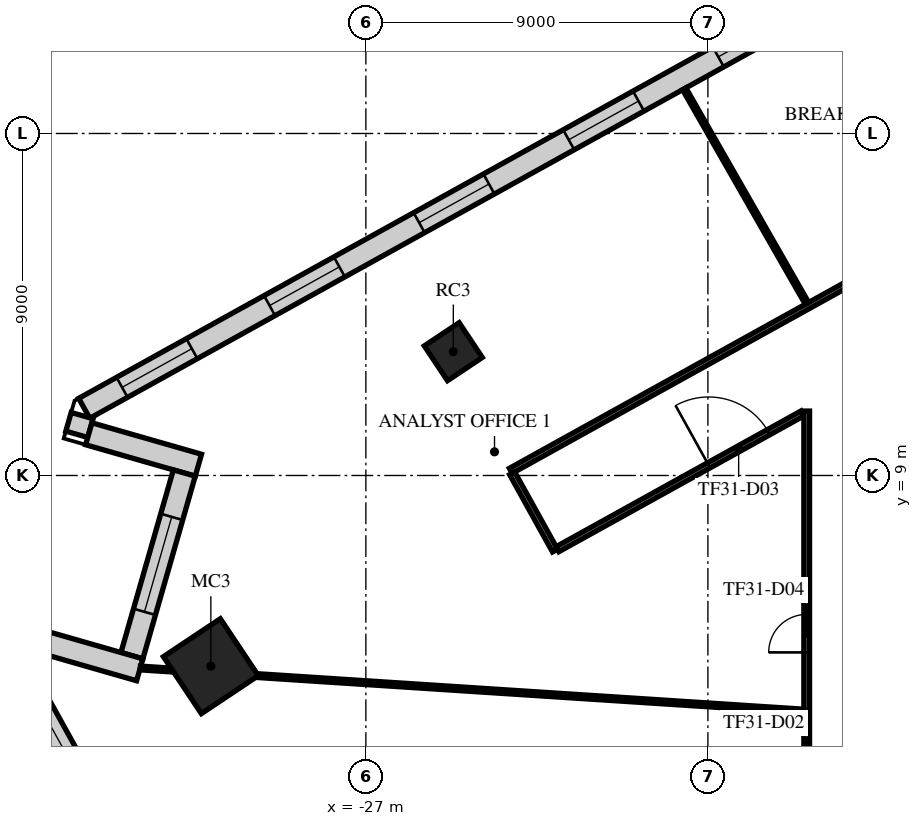
"""IFC4 building model, lengths in metres.
Left out: names, types, materials, properties, quantities, classifications, styles, units other than length and angle.
Written with IfcOpenShell. Run it as: python <this file> out.ifc"""

import sys

from ifc_helpers import new_model, si_unit, direction, frame, frame_2d, origin, origin_2d, place, context, subcontext, project, spatial, rectangle, extrude, element, fill, save


model = new_model("IFC4")
c1 = context("Model", 3, precision=1e-05, world=origin(), true_north=direction((0.0, 1.0)))
c2 = subcontext(c1, "Body", "Model", "MODEL_VIEW")
j1 = project(units=[si_unit("LENGTHUNIT", "METRE"), si_unit("PLANEANGLEUNIT", "RADIAN")], contexts=[c1])
p1 = place(None, origin())
s1 = spatial("IfcSite", under=j1, at=p1, CompositionType="ELEMENT")
p2 = place(p1, origin())
s2 = spatial("IfcBuilding", under=s1, at=p2, CompositionType="ELEMENT")
p3 = place(p2, frame((0.0, 0.0, 135.7)))
s3 = spatial("IfcBuildingStorey", under=s2, at=p3, CompositionType="ELEMENT", Elevation=135.7)
p4 = place(p3, frame((-24.699, 12.258, -0.4), z_axis=(0.0, 0.0, 1.0), x_axis=(0.832028680356, 0.55473261583, 0.0)))
e1 = element("IfcColumn", 1, at=p4, inside=s3, PredefinedType="COLUMN", context=c2, shape_type="SweptSolid", body=[
    extrude(rectangle(XDim=1.1, YDim=1.1, at=origin_2d()), origin(), (0.0, 0.0, 1.0), 4.4),
])
p5 = place(p3, frame((-31.079, 3.982, -0.4), z_axis=(0.0, 0.0, 1.0), x_axis=(0.832028680356, 0.55473261583, 0.0)))
e2 = element("IfcColumn", 2, at=p5, inside=s3, PredefinedType="COLUMN", context=c2, shape_type="SweptSolid", body=[
    extrude(rectangle(XDim=1.8, YDim=1.8, at=origin_2d()), origin(), (0.0, 0.0, 1.0), 4.4),
])
p6 = place(p3, frame((8.775, 34.705, 0.0), z_axis=(0.0, 0.0, 1.0), x_axis=(-0.874620778241, -0.484807687922, 0.0)))
e3 = element("IfcWall", 3, at=p6, inside=s3, PredefinedType="STANDARD", context=c2, shape_type="SweptSolid", body=[
    extrude(rectangle(XDim=49.376, YDim=0.6, at=frame_2d((24.688, 0.0))), origin(), (0.0, 0.0, 1.0), 3.6),
])
p7 = place(p6, frame((1.2, 0.0, 0.9)))
e4 = element("IfcOpeningElement", 4, at=p7, cuts=e3, PredefinedType="OPENING", context=c2, shape_type="SweptSolid", body=[
    extrude(rectangle(XDim=2.1, YDim=2.1, at=frame_2d((1.05, 1.05))), frame((0.0, 0.31, 0.0), z_axis=(0.0, -1.0, 0.0), x_axis=(1.0, 0.0, 0.0)), (0.0, 0.0, 1.0), 0.62),
])
p8 = place(p6, frame((5.7, 0.0, 0.9)))
e5 = element("IfcOpeningElement", 5, at=p8, cuts=e3, PredefinedType="OPENING", context=c2, shape_type="SweptSolid", body=[
    extrude(rectangle(XDim=2.1, YDim=2.1, at=frame_2d((1.05, 1.05))), frame((0.0, 0.31, 0.0), z_axis=(0.0, -1.0, 0.0), x_axis=(1.0, 0.0, 0.0)), (0.0, 0.0, 1.0), 0.62),
])
p9 = place(p6, frame((14.7, 0.0, 0.9)))
e6 = element("IfcOpeningElement", 6, at=p9, cuts=e3, PredefinedType="OPENING", context=c2, shape_type="SweptSolid", body=[
    extrude(rectangle(XDim=2.1, YDim=2.1, at=frame_2d((1.05, 1.05))), frame((0.0, 0.31, 0.0), z_axis=(0.0, -1.0, 0.0), x_axis=(1.0, 0.0, 0.0)), (0.0, 0.0, 1.0), 0.62),
])
p10 = place(p6, frame((19.2, 0.0, 0.9)))
e7 = element("IfcOpeningElement", 7, at=p10, cuts=e3, PredefinedType="OPENING", context=c2, shape_type="SweptSolid", body=[
    extrude(rectangle(XDim=2.1, YDim=2.1, at=frame_2d((1.05, 1.05))), frame((0.0, 0.31, 0.0), z_axis=(0.0, -1.0, 0.0), x_axis=(1.0, 0.0, 0.0)), (0.0, 0.0, 1.0), 0.62),
])
p11 = place(p6, frame((23.7, 0.0, 0.9)))
e8 = element("IfcOpeningElement", 8, at=p11, cuts=e3, PredefinedType="OPENING", context=c2, shape_type="SweptSolid", body=[
    extrude(rectangle(XDim=2.1, YDim=2.1, at=frame_2d((1.05, 1.05))), frame((0.0, 0.31, 0.0), z_axis=(0.0, -1.0, 0.0), x_axis=(1.0, 0.0, 0.0)), (0.0, 0.0, 1.0), 0.62),
])
p12 = place(p6, frame((28.2, 0.0, 0.9)))
e9 = element("IfcOpeningElement", 9, at=p12, cuts=e3, PredefinedType="OPENING", context=c2, shape_type="SweptSolid", body=[
    extrude(rectangle(XDim=2.1, YDim=2.1, at=frame_2d((1.05, 1.05))), frame((0.0, 0.31, 0.0), z_axis=(0.0, -1.0, 0.0), x_axis=(1.0, 0.0, 0.0)), (0.0, 0.0, 1.0), 0.62),
])
p13 = place(p6, frame((32.7, 0.0, 0.9)))
e10 = element("IfcOpeningElement", 10, at=p13, cuts=e3, PredefinedType="OPENING", context=c2, shape_type="SweptSolid", body=[
    extrude(rectangle(XDim=2.1, YDim=2.1, at=frame_2d((1.05, 1.05))), frame((0.0, 0.31, 0.0), z_axis=(0.0, -1.0, 0.0), x_axis=(1.0, 0.0, 0.0)), (0.0, 0.0, 1.0), 0.62),
])
p14 = place(p6, frame((37.2, 0.0, 0.9)))
e11 = element("IfcOpeningElement", 11, at=p14, cuts=e3, PredefinedType="OPENING", context=c2, shape_type="SweptSolid", body=[
    extrude(rectangle(XDim=2.1, YDim=2.1, at=frame_2d((1.05, 1.05))), frame((0.0, 0.31, 0.0), z_axis=(0.0, -1.0, 0.0), x_axis=(1.0, 0.0, 0.0)), (0.0, 0.0, 1.0), 0.62),
])
p15 = place(p6, frame((41.7, 0.0, 0.9)))
e12 = element("IfcOpeningElement", 12, at=p15, cuts=e3, PredefinedType="OPENING", context=c2, shape_type="SweptSolid", body=[
    extrude(rectangle(XDim=2.1, YDim=2.1, at=frame_2d((1.05, 1.05))), frame((0.0, 0.31, 0.0), z_axis=(0.0, -1.0, 0.0), x_axis=(1.0, 0.0, 0.0)), (0.0, 0.0, 1.0), 0.62),
])
p16 = place(p6, frame((46.138, 0.0, 0.9)))
e13 = element("IfcOpeningElement", 13, at=p16, cuts=e3, PredefinedType="OPENING", context=c2, shape_type="SweptSolid", body=[
    extrude(rectangle(XDim=2.1, YDim=2.1, at=frame_2d((1.05, 1.05))), frame((0.0, 0.31, 0.0), z_axis=(0.0, -1.0, 0.0), x_axis=(1.0, 0.0, 0.0)), (0.0, 0.0, 1.0), 0.62),
])
p17 = place(p3, frame((-34.466, 10.575, 0.0), z_axis=(0.0, 0.0, 1.0), x_axis=(-0.275667500387, -0.96125305161, 0.0)))
e14 = element("IfcWall", 14, at=p17, inside=s3, PredefinedType="STANDARD", context=c2, shape_type="SweptSolid", body=[
    extrude(rectangle(XDim=0.511, YDim=0.6, at=frame_2d((0.255, 0.0))), origin(), (0.0, 0.0, 1.0), 3.6),
])
p18 = place(p3, frame((-34.291, 10.097, 0.0), z_axis=(0.0, 0.0, 1.0), x_axis=(0.96126248289, -0.275634611374, 0.0)))
e15 = element("IfcWall", 15, at=p18, inside=s3, PredefinedType="STANDARD", context=c2, shape_type="SweptSolid", body=[
    extrude(rectangle(XDim=3.0, YDim=0.6, at=frame_2d((1.5, 0.0))), origin(), (0.0, 0.0, 1.0), 3.6),
])
p19 = place(p3, frame((-31.778, 9.065, 0.0), z_axis=(0.0, 0.0, 1.0), x_axis=(-0.275675415896, -0.961250781571, 0.0)))
e16 = element("IfcWall", 16, at=p19, inside=s3, PredefinedType="STANDARD", context=c2, shape_type="SweptSolid", body=[
    extrude(rectangle(XDim=5.0, YDim=0.6, at=frame_2d((2.5, 0.0))), origin(), (0.0, 0.0, 1.0), 3.6),
])
p20 = place(p19, frame((1.2, 0.0, 0.9)))
e17 = element("IfcOpeningElement", 17, at=p20, cuts=e16, PredefinedType="OPENING", context=c2, shape_type="SweptSolid", body=[
    extrude(rectangle(XDim=2.6, YDim=2.1, at=frame_2d((1.3, 1.05))), frame((0.0, 0.31, 0.0), z_axis=(0.0, -1.0, 0.0), x_axis=(1.0, 0.0, 0.0)), (0.0, 0.0, 1.0), 0.62),
])
p21 = place(p3, frame((-32.95, 3.887, 0.0), z_axis=(0.0, 0.0, 1.0), x_axis=(-0.96126248289, 0.275634611374, 0.0)))
e18 = element("IfcWall", 18, at=p21, inside=s3, PredefinedType="STANDARD", context=c2, shape_type="SweptSolid", body=[
    extrude(rectangle(XDim=3.0, YDim=0.6, at=frame_2d((1.5, 0.0))), origin(), (0.0, 0.0, 1.0), 3.6),
])
p22 = place(p3, frame((-36.291, 4.209, 0.0), z_axis=(0.0, 0.0, 1.0), x_axis=(0.484810659622, -0.874619131003, 0.0)))
e19 = element("IfcWall", 19, at=p22, inside=s3, PredefinedType="STANDARD", context=c2, shape_type="SweptSolid", body=[
    extrude(rectangle(XDim=42.552, YDim=0.6, at=frame_2d((21.276, 0.0))), origin(), (0.0, 0.0, 1.0), 3.6),
])
p23 = place(p22, frame((1.178, 0.0, 0.9)))
e20 = element("IfcOpeningElement", 20, at=p23, cuts=e19, PredefinedType="OPENING", context=c2, shape_type="SweptSolid", body=[
    extrude(rectangle(XDim=1.8, YDim=2.1, at=frame_2d((0.9, 1.05))), frame((0.0, 0.31, 0.0), z_axis=(0.0, -1.0, 0.0), x_axis=(1.0, 0.0, 0.0)), (0.0, 0.0, 1.0), 0.62),
])
p24 = place(p22, frame((5.396, 0.0, 0.9)))
e21 = element("IfcOpeningElement", 21, at=p24, cuts=e19, PredefinedType="OPENING", context=c2, shape_type="SweptSolid", body=[
    extrude(rectangle(XDim=1.8, YDim=2.1, at=frame_2d((0.9, 1.05))), frame((0.0, 0.31, 0.0), z_axis=(0.0, -1.0, 0.0), x_axis=(1.0, 0.0, 0.0)), (0.0, 0.0, 1.0), 0.62),
])
p25 = place(p22, frame((13.956, 0.0, 0.9)))
e22 = element("IfcOpeningElement", 22, at=p25, cuts=e19, PredefinedType="OPENING", context=c2, shape_type="SweptSolid", body=[
    extrude(rectangle(XDim=1.8, YDim=2.1, at=frame_2d((0.9, 1.05))), frame((0.0, 0.31, 0.0), z_axis=(0.0, -1.0, 0.0), x_axis=(1.0, 0.0, 0.0)), (0.0, 0.0, 1.0), 0.62),
])
p26 = place(p22, frame((18.236, 0.0, 0.9)))
e23 = element("IfcOpeningElement", 23, at=p26, cuts=e19, PredefinedType="OPENING", context=c2, shape_type="SweptSolid", body=[
    extrude(rectangle(XDim=1.8, YDim=2.1, at=frame_2d((0.9, 1.05))), frame((0.0, 0.31, 0.0), z_axis=(0.0, -1.0, 0.0), x_axis=(1.0, 0.0, 0.0)), (0.0, 0.0, 1.0), 0.62),
])
p27 = place(p22, frame((22.516, 0.0, 0.9)))
e24 = element("IfcOpeningElement", 24, at=p27, cuts=e19, PredefinedType="OPENING", context=c2, shape_type="SweptSolid", body=[
    extrude(rectangle(XDim=1.8, YDim=2.1, at=frame_2d((0.9, 1.05))), frame((0.0, 0.31, 0.0), z_axis=(0.0, -1.0, 0.0), x_axis=(1.0, 0.0, 0.0)), (0.0, 0.0, 1.0), 0.62),
])
p28 = place(p22, frame((26.796, 0.0, 0.9)))
e25 = element("IfcOpeningElement", 25, at=p28, cuts=e19, PredefinedType="OPENING", context=c2, shape_type="SweptSolid", body=[
    extrude(rectangle(XDim=1.8, YDim=2.1, at=frame_2d((0.9, 1.05))), frame((0.0, 0.31, 0.0), z_axis=(0.0, -1.0, 0.0), x_axis=(1.0, 0.0, 0.0)), (0.0, 0.0, 1.0), 0.62),
])
p29 = place(p22, frame((31.076, 0.0, 0.9)))
e26 = element("IfcOpeningElement", 26, at=p29, cuts=e19, PredefinedType="OPENING", context=c2, shape_type="SweptSolid", body=[
    extrude(rectangle(XDim=1.8, YDim=2.1, at=frame_2d((0.9, 1.05))), frame((0.0, 0.31, 0.0), z_axis=(0.0, -1.0, 0.0), x_axis=(1.0, 0.0, 0.0)), (0.0, 0.0, 1.0), 0.62),
])
p30 = place(p22, frame((35.356, 0.0, 0.9)))
e27 = element("IfcOpeningElement", 27, at=p30, cuts=e19, PredefinedType="OPENING", context=c2, shape_type="SweptSolid", body=[
    extrude(rectangle(XDim=1.8, YDim=2.1, at=frame_2d((0.9, 1.05))), frame((0.0, 0.31, 0.0), z_axis=(0.0, -1.0, 0.0), x_axis=(1.0, 0.0, 0.0)), (0.0, 0.0, 1.0), 0.62),
])
p31 = place(p22, frame((39.573, 0.0, 0.9)))
e28 = element("IfcOpeningElement", 28, at=p31, cuts=e19, PredefinedType="OPENING", context=c2, shape_type="SweptSolid", body=[
    extrude(rectangle(XDim=1.8, YDim=2.1, at=frame_2d((0.9, 1.05))), frame((0.0, 0.31, 0.0), z_axis=(0.0, -1.0, 0.0), x_axis=(1.0, 0.0, 0.0)), (0.0, 0.0, 1.0), 0.62),
])
p32 = place(p3, frame((-23.187, 9.123, 0.0), z_axis=(0.0, 0.0, 1.0), x_axis=(0.874618419846, 0.484811942578, 0.0)))
e29 = element("IfcWall", 29, at=p32, inside=s3, PredefinedType="PARTITIONING", context=c2, shape_type="SweptSolid", body=[
    extrude(rectangle(XDim=31.713, YDim=0.15, at=frame_2d((15.857, 0.0))), origin(), (0.0, 0.0, 1.0), 3.15),
])
p33 = place(p32, frame((11.252, 0.0, 0.0)))
e30 = element("IfcOpeningElement", 30, at=p33, cuts=e29, PredefinedType="OPENING", context=c2, shape_type="SweptSolid", body=[
    extrude(rectangle(XDim=1.0, YDim=2.1, at=frame_2d((0.5, 1.05))), frame((0.0, 0.085, 0.0), z_axis=(0.0, -1.0, 0.0), x_axis=(1.0, 0.0, 0.0)), (0.0, 0.0, 1.0), 0.17),
])
p34 = place(p32, frame((19.896, 0.0, 0.0)))
e31 = element("IfcOpeningElement", 31, at=p34, cuts=e29, PredefinedType="OPENING", context=c2, shape_type="SweptSolid", body=[
    extrude(rectangle(XDim=1.0, YDim=2.1, at=frame_2d((0.5, 1.05))), frame((0.0, 0.085, 0.0), z_axis=(0.0, -1.0, 0.0), x_axis=(1.0, 0.0, 0.0)), (0.0, 0.0, 1.0), 0.17),
])
p35 = place(p32, frame((29.223, 0.0, 0.0)))
e32 = element("IfcOpeningElement", 32, at=p35, cuts=e29, PredefinedType="OPENING", context=c2, shape_type="SweptSolid", body=[
    extrude(rectangle(XDim=1.0, YDim=2.1, at=frame_2d((0.5, 1.05))), frame((0.0, 0.085, 0.0), z_axis=(0.0, -1.0, 0.0), x_axis=(1.0, 0.0, 0.0)), (0.0, 0.0, 1.0), 0.17),
])
p36 = place(p3, frame((-23.151, 9.057, 0.0), z_axis=(0.0, 0.0, 1.0), x_axis=(0.484983092102, -0.874523527628, 0.0)))
e33 = element("IfcWall", 33, at=p36, inside=s3, PredefinedType="PARTITIONING", context=c2, shape_type="SweptSolid", body=[
    extrude(rectangle(XDim=2.325, YDim=0.15, at=frame_2d((1.163, 0.0))), origin(), (0.0, 0.0, 1.0), 3.15),
])
p37 = place(p3, frame((-21.958, 7.06, 0.0), z_axis=(0.0, 0.0, 1.0), x_axis=(0.87462563297, 0.484798929611, 0.0)))
e34 = element("IfcWall", 34, at=p37, inside=s3, PredefinedType="PARTITIONING", context=c2, shape_type="SweptSolid", body=[
    extrude(rectangle(XDim=7.37, YDim=0.15, at=frame_2d((3.685, 0.0))), origin(), (0.0, 0.0, 1.0), 3.15),
])
p38 = place(p37, frame((4.55, 0.0, 0.0)))
e35 = element("IfcOpeningElement", 35, at=p38, cuts=e34, PredefinedType="OPENING", context=c2, shape_type="SweptSolid", body=[
    extrude(rectangle(XDim=1.8, YDim=2.1, at=frame_2d((0.9, 1.05))), frame((0.0, 0.085, 0.0), z_axis=(0.0, -1.0, 0.0), x_axis=(1.0, 0.0, 0.0)), (0.0, 0.0, 1.0), 0.17),
])
p39 = place(p3, frame((-15.4, -3.201, 0.0), z_axis=(0.0, 0.0, 1.0), x_axis=(0.0, 1.0, 0.0)))
e36 = element("IfcWall", 36, at=p39, inside=s3, PredefinedType="PARTITIONING", context=c2, shape_type="SweptSolid", body=[
    extrude(rectangle(XDim=13.896, YDim=0.15, at=frame_2d((6.948, 0.0))), origin(), (0.0, 0.0, 1.0), 3.15),
])
p40 = place(p39, frame((4.05, 0.0, 0.0)))
e37 = element("IfcOpeningElement", 37, at=p40, cuts=e36, PredefinedType="OPENING", context=c2, shape_type="SweptSolid", body=[
    extrude(rectangle(XDim=1.0, YDim=2.1, at=frame_2d((0.5, 1.05))), frame((0.0, 0.085, 0.0), z_axis=(0.0, -1.0, 0.0), x_axis=(1.0, 0.0, 0.0)), (0.0, 0.0, 1.0), 0.17),
])
p41 = place(p39, frame((7.546, 0.0, 0.0)))
e38 = element("IfcOpeningElement", 38, at=p41, cuts=e36, PredefinedType="OPENING", context=c2, shape_type="SweptSolid", body=[
    extrude(rectangle(XDim=1.0, YDim=2.1, at=frame_2d((0.5, 1.05))), frame((0.0, 0.085, 0.0), z_axis=(0.0, -1.0, 0.0), x_axis=(1.0, 0.0, 0.0)), (0.0, 0.0, 1.0), 0.17),
])
p42 = place(p3, frame((-32.935, 3.934, 0.0), z_axis=(0.0, 0.0, 1.0), x_axis=(0.997900062075, -0.064772417822, 0.0)))
e39 = element("IfcWall", 39, at=p42, inside=s3, PredefinedType="PARTITIONING", context=c2, shape_type="SweptSolid", body=[
    extrude(rectangle(XDim=0.844, YDim=0.1, at=frame_2d((0.422, 0.0))), origin(), (0.0, 0.0, 1.0), 3.6),
])
p43 = place(p3, frame((-29.831, 3.732, 0.0), z_axis=(0.0, 0.0, 1.0), x_axis=(0.997896608912, -0.0648255962, 0.0)))
e40 = element("IfcWall", 40, at=p43, inside=s3, PredefinedType="PARTITIONING", context=c2, shape_type="SweptSolid", body=[
    extrude(rectangle(XDim=14.383, YDim=0.1, at=frame_2d((7.191, 0.0))), origin(), (0.0, 0.0, 1.0), 3.03),
])
p44 = place(p3, frame((-18.622, 19.174, 0.0), z_axis=(0.0, 0.0, 1.0), x_axis=(0.496555361039, -0.8680050538, 0.0)))
e41 = element("IfcWall", 41, at=p44, inside=s3, PredefinedType="PARTITIONING", context=c2, shape_type="SweptSolid", body=[
    extrude(rectangle(XDim=6.502, YDim=0.1, at=frame_2d((3.251, 0.0))), origin(), (0.0, 0.0, 1.0), 3.15),
])
p45 = place(p12, origin())
e42 = element("IfcWindow", 42, at=p45, inside=s3, PartitioningType="SINGLE_PANEL", PredefinedType="WINDOW", context=c2, shape_type="SweptSolid", body=[
    extrude(rectangle(XDim=2.1, YDim=2.1, at=frame_2d((1.05, 1.05))), frame((0.0, 0.03, 0.0), z_axis=(0.0, -1.0, 0.0), x_axis=(1.0, 0.0, 0.0)), (0.0, 0.0, 1.0), 0.06),
])
fill(e9, e42)
p46 = place(p13, origin())
e43 = element("IfcWindow", 43, at=p46, inside=s3, PartitioningType="SINGLE_PANEL", PredefinedType="WINDOW", context=c2, shape_type="SweptSolid", body=[
    extrude(rectangle(XDim=2.1, YDim=2.1, at=frame_2d((1.05, 1.05))), frame((0.0, 0.03, 0.0), z_axis=(0.0, -1.0, 0.0), x_axis=(1.0, 0.0, 0.0)), (0.0, 0.0, 1.0), 0.06),
])
fill(e10, e43)
p47 = place(p14, origin())
e44 = element("IfcWindow", 44, at=p47, inside=s3, PartitioningType="SINGLE_PANEL", PredefinedType="WINDOW", context=c2, shape_type="SweptSolid", body=[
    extrude(rectangle(XDim=2.1, YDim=2.1, at=frame_2d((1.05, 1.05))), frame((0.0, 0.03, 0.0), z_axis=(0.0, -1.0, 0.0), x_axis=(1.0, 0.0, 0.0)), (0.0, 0.0, 1.0), 0.06),
])
fill(e11, e44)
p48 = place(p15, origin())
e45 = element("IfcWindow", 45, at=p48, inside=s3, PartitioningType="SINGLE_PANEL", PredefinedType="WINDOW", context=c2, shape_type="SweptSolid", body=[
    extrude(rectangle(XDim=2.1, YDim=2.1, at=frame_2d((1.05, 1.05))), frame((0.0, 0.03, 0.0), z_axis=(0.0, -1.0, 0.0), x_axis=(1.0, 0.0, 0.0)), (0.0, 0.0, 1.0), 0.06),
])
fill(e12, e45)
p49 = place(p16, origin())
e46 = element("IfcWindow", 46, at=p49, inside=s3, PartitioningType="SINGLE_PANEL", PredefinedType="WINDOW", context=c2, shape_type="SweptSolid", body=[
    extrude(rectangle(XDim=2.1, YDim=2.1, at=frame_2d((1.05, 1.05))), frame((0.0, 0.03, 0.0), z_axis=(0.0, -1.0, 0.0), x_axis=(1.0, 0.0, 0.0)), (0.0, 0.0, 1.0), 0.06),
])
fill(e13, e46)
p50 = place(p20, origin())
e47 = element("IfcWindow", 47, at=p50, inside=s3, PartitioningType="SINGLE_PANEL", PredefinedType="WINDOW", context=c2, shape_type="SweptSolid", body=[
    extrude(rectangle(XDim=2.6, YDim=2.1, at=frame_2d((1.3, 1.05))), frame((0.0, 0.03, 0.0), z_axis=(0.0, -1.0, 0.0), x_axis=(1.0, 0.0, 0.0)), (0.0, 0.0, 1.0), 0.06),
])
fill(e17, e47)
p51 = place(p23, origin())
e48 = element("IfcWindow", 48, at=p51, inside=s3, PartitioningType="SINGLE_PANEL", PredefinedType="WINDOW", context=c2, shape_type="SweptSolid", body=[
    extrude(rectangle(XDim=1.8, YDim=2.1, at=frame_2d((0.9, 1.05))), frame((0.0, 0.03, 0.0), z_axis=(0.0, -1.0, 0.0), x_axis=(1.0, 0.0, 0.0)), (0.0, 0.0, 1.0), 0.06),
])
fill(e20, e48)
p52 = place(p38, frame((1.8, 0.0, 0.0), z_axis=(0.0, 0.0, 1.0), x_axis=(-1.0, 0.0, 0.0)))
e49 = element("IfcDoor", 49, at=p52, inside=s3, OperationType="DOUBLE_DOOR_SINGLE_SWING", PredefinedType="DOOR", context=c2, shape_type="SweptSolid", body=[
    extrude(rectangle(XDim=1.8, YDim=2.1, at=frame_2d((0.9, 1.05))), frame((0.0, 0.025, 0.0), z_axis=(0.0, -1.0, 0.0), x_axis=(1.0, 0.0, 0.0)), (0.0, 0.0, 1.0), 0.05),
])
fill(e35, e49)
p53 = place(p41, origin())
e50 = element("IfcDoor", 50, at=p53, inside=s3, OperationType="SINGLE_SWING_RIGHT", PredefinedType="DOOR", context=c2, shape_type="SweptSolid", body=[
    extrude(rectangle(XDim=1.0, YDim=2.1, at=frame_2d((0.5, 1.05))), frame((0.0, 0.025, 0.0), z_axis=(0.0, -1.0, 0.0), x_axis=(1.0, 0.0, 0.0)), (0.0, 0.0, 1.0), 0.05),
])
fill(e38, e50)
save(model, sys.argv[1])
